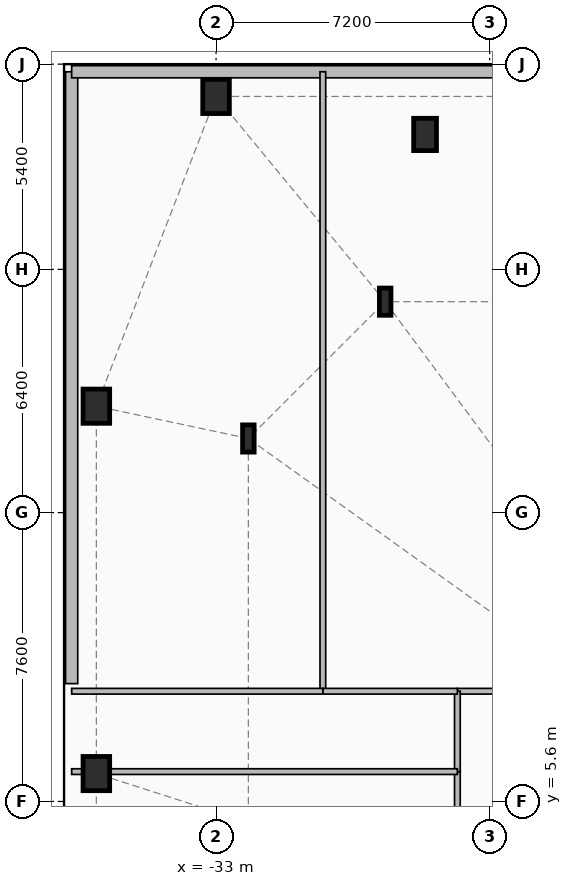
"""IFC4 building model, lengths in metres.
Left out: names, types, materials, properties, quantities, classifications, styles, units other than length and angle.
Written with IfcOpenShell. Run it as: python <this file> out.ifc"""

import sys

from ifc_helpers import new_model, si_unit, direction, frame, frame_2d, origin, origin_2d, place, context, subcontext, project, spatial, rectangle, i_section, extrude, element, fill, save


model = new_model("IFC4")
c1 = context("Model", 3, precision=1e-05, world=origin(), true_north=direction((0.0, 1.0)))
c2 = subcontext(c1, "Body", "Model", "MODEL_VIEW")
j1 = project(units=[si_unit("LENGTHUNIT", "METRE"), si_unit("PLANEANGLEUNIT", "RADIAN")], contexts=[c1])
p1 = place(None, origin())
s1 = spatial("IfcSite", under=j1, at=p1, CompositionType="ELEMENT")
p2 = place(p1, origin())
s2 = spatial("IfcBuilding", under=s1, at=p2, CompositionType="ELEMENT")
p3 = place(p2, frame((0.0, 0.0, 22.5)))
s3 = spatial("IfcBuildingStorey", under=s2, at=p3, CompositionType="ELEMENT", Elevation=22.5)
for number, where, z_axis, x_axis in (
    (1, (-33.0, 24.15, 0.0), (0.0, 0.0, 1.0), (1.0, 0.0, 0.0)),
    (2, (-36.15, 6.333, 0.0), (0.0, 0.0, 1.0), (1.0, 0.0, 0.0)),
    (3, (-36.15, 16.0, 0.0), (0.0, 0.0, 1.0), (1.0, 0.0, 0.0)),
):
    element("IfcColumn", number, at=place(p3, frame(where, z_axis=z_axis, x_axis=x_axis)), inside=s3, PredefinedType="COLUMN", context=c2, shape_type="SweptSolid", body=[
        extrude(rectangle(XDim=0.7, YDim=0.9, at=origin_2d()), origin(), (0.0, 0.0, 1.0), 4.5),
    ])
p4 = place(p3, frame((-27.5, 23.15, 0.0), z_axis=(0.0, 0.0, 1.0), x_axis=(1.0, 0.0, 0.0)))
e4 = element("IfcColumn", 4, at=p4, inside=s3, PredefinedType="PILASTER", context=c2, shape_type="SweptSolid", body=[
    extrude(rectangle(XDim=0.6, YDim=0.85, at=origin_2d()), origin(), (0.0, 0.0, 1.0), 4.5),
])
for number, where, z_axis, x_axis in (
    (5, (-28.55, 18.75, 0.0), (0.0, 0.0, 1.0), (1.0, 0.0, 0.0)),
    (6, (-32.15, 15.15, 0.0), (0.0, 0.0, 1.0), (1.0, 0.0, 0.0)),
):
    element("IfcColumn", number, at=place(p3, frame(where, z_axis=z_axis, x_axis=x_axis)), inside=s3, PredefinedType="COLUMN", context=c2, shape_type="SweptSolid", body=[
        extrude(i_section(OverallWidth=0.304, OverallDepth=0.716, WebThickness=0.021, FlangeThickness=0.04, FilletRadius=0.027, at=origin_2d()), origin(), (0.0, 0.0, 1.0), 4.5),
    ])
p5 = place(p3, frame((-36.8, 8.7, 0.0), z_axis=(0.0, 0.0, 1.0), x_axis=(0.0, 1.0, 0.0)))
e7 = element("IfcWall", 7, at=p5, inside=s3, PredefinedType="SOLIDWALL", context=c2, shape_type="SweptSolid", body=[
    extrude(rectangle(XDim=16.1, YDim=0.32, at=frame_2d((8.05, 0.0))), origin(), (0.0, 0.0, 1.0), 4.16),
])
p6 = place(p5, frame((8.485, 0.0, 0.85)))
e8 = element("IfcOpeningElement", 8, at=p6, cuts=e7, PredefinedType="OPENING", context=c2, shape_type="SweptSolid", body=[
    extrude(rectangle(XDim=2.6, YDim=2.4, at=frame_2d((1.3, 1.2))), frame((0.0, 0.17, 0.0), z_axis=(0.0, -1.0, 0.0), x_axis=(1.0, 0.0, 0.0)), (0.0, 0.0, 1.0), 0.34),
])
p7 = place(p3, frame((-36.8, 24.8, 0.0), z_axis=(0.0, 0.0, 1.0), x_axis=(1.0, 0.0, 0.0)))
e9 = element("IfcWall", 9, at=p7, inside=s3, PredefinedType="SOLIDWALL", context=c2, shape_type="SweptSolid", body=[
    extrude(rectangle(XDim=73.6, YDim=0.32, at=frame_2d((36.8, 0.0))), origin(), (0.0, 0.0, 1.0), 4.16),
])
p8 = place(p7, frame((1.079, 0.0, 0.85)))
e10 = element("IfcOpeningElement", 10, at=p8, cuts=e9, PredefinedType="OPENING", context=c2, shape_type="SweptSolid", body=[
    extrude(rectangle(XDim=2.3, YDim=2.4, at=frame_2d((1.15, 1.2))), frame((0.0, 0.17, 0.0), z_axis=(0.0, -1.0, 0.0), x_axis=(1.0, 0.0, 0.0)), (0.0, 0.0, 1.0), 0.34),
])
p9 = place(p7, frame((8.431, 0.0, 0.85)))
e11 = element("IfcOpeningElement", 11, at=p9, cuts=e9, PredefinedType="OPENING", context=c2, shape_type="SweptSolid", body=[
    extrude(rectangle(XDim=2.6, YDim=2.4, at=frame_2d((1.3, 1.2))), frame((0.0, 0.17, 0.0), z_axis=(0.0, -1.0, 0.0), x_axis=(1.0, 0.0, 0.0)), (0.0, 0.0, 1.0), 0.34),
])
p10 = place(p7, frame((13.316, 0.0, 0.85)))
e12 = element("IfcOpeningElement", 12, at=p10, cuts=e9, PredefinedType="OPENING", context=c2, shape_type="SweptSolid", body=[
    extrude(rectangle(XDim=1.1, YDim=1.85, at=frame_2d((0.55, 0.925))), frame((0.0, 0.17, 0.0), z_axis=(0.0, -1.0, 0.0), x_axis=(1.0, 0.0, 0.0)), (0.0, 0.0, 1.0), 0.34),
])
p11 = place(p7, frame((16.339, 0.0, 0.85)))
e13 = element("IfcOpeningElement", 13, at=p11, cuts=e9, PredefinedType="OPENING", context=c2, shape_type="SweptSolid", body=[
    extrude(rectangle(XDim=2.0, YDim=2.4, at=frame_2d((1.0, 1.2))), frame((0.0, 0.17, 0.0), z_axis=(0.0, -1.0, 0.0), x_axis=(1.0, 0.0, 0.0)), (0.0, 0.0, 1.0), 0.34),
])
p12 = place(p7, frame((21.875, 0.0, 0.85)))
e14 = element("IfcOpeningElement", 14, at=p12, cuts=e9, PredefinedType="OPENING", context=c2, shape_type="SweptSolid", body=[
    extrude(rectangle(XDim=2.3, YDim=2.4, at=frame_2d((1.15, 1.2))), frame((0.0, 0.17, 0.0), z_axis=(0.0, -1.0, 0.0), x_axis=(1.0, 0.0, 0.0)), (0.0, 0.0, 1.0), 0.34),
])
p13 = place(p7, frame((26.53, 0.0, 0.85)))
e15 = element("IfcOpeningElement", 15, at=p13, cuts=e9, PredefinedType="OPENING", context=c2, shape_type="SweptSolid", body=[
    extrude(rectangle(XDim=2.6, YDim=2.4, at=frame_2d((1.3, 1.2))), frame((0.0, 0.17, 0.0), z_axis=(0.0, -1.0, 0.0), x_axis=(1.0, 0.0, 0.0)), (0.0, 0.0, 1.0), 0.34),
])
p14 = place(p7, frame((32.537, 0.0, 0.85)))
e16 = element("IfcOpeningElement", 16, at=p14, cuts=e9, PredefinedType="OPENING", context=c2, shape_type="SweptSolid", body=[
    extrude(rectangle(XDim=2.6, YDim=2.4, at=frame_2d((1.3, 1.2))), frame((0.0, 0.17, 0.0), z_axis=(0.0, -1.0, 0.0), x_axis=(1.0, 0.0, 0.0)), (0.0, 0.0, 1.0), 0.34),
])
p15 = place(p7, frame((38.543, 0.0, 0.85)))
e17 = element("IfcOpeningElement", 17, at=p15, cuts=e9, PredefinedType="OPENING", context=c2, shape_type="SweptSolid", body=[
    extrude(rectangle(XDim=2.6, YDim=2.4, at=frame_2d((1.3, 1.2))), frame((0.0, 0.17, 0.0), z_axis=(0.0, -1.0, 0.0), x_axis=(1.0, 0.0, 0.0)), (0.0, 0.0, 1.0), 0.34),
])
p16 = place(p7, frame((44.55, 0.0, 0.85)))
e18 = element("IfcOpeningElement", 18, at=p16, cuts=e9, PredefinedType="OPENING", context=c2, shape_type="SweptSolid", body=[
    extrude(rectangle(XDim=2.6, YDim=2.4, at=frame_2d((1.3, 1.2))), frame((0.0, 0.17, 0.0), z_axis=(0.0, -1.0, 0.0), x_axis=(1.0, 0.0, 0.0)), (0.0, 0.0, 1.0), 0.34),
])
p17 = place(p7, frame((50.556, 0.0, 0.85)))
e19 = element("IfcOpeningElement", 19, at=p17, cuts=e9, PredefinedType="OPENING", context=c2, shape_type="SweptSolid", body=[
    extrude(rectangle(XDim=2.6, YDim=2.4, at=frame_2d((1.3, 1.2))), frame((0.0, 0.17, 0.0), z_axis=(0.0, -1.0, 0.0), x_axis=(1.0, 0.0, 0.0)), (0.0, 0.0, 1.0), 0.34),
])
p18 = place(p7, frame((55.341, 0.0, 0.85)))
e20 = element("IfcOpeningElement", 20, at=p18, cuts=e9, PredefinedType="OPENING", context=c2, shape_type="SweptSolid", body=[
    extrude(rectangle(XDim=2.0, YDim=2.4, at=frame_2d((1.0, 1.2))), frame((0.0, 0.17, 0.0), z_axis=(0.0, -1.0, 0.0), x_axis=(1.0, 0.0, 0.0)), (0.0, 0.0, 1.0), 0.34),
])
p19 = place(p7, frame((59.16, 0.0, 0.85)))
e21 = element("IfcOpeningElement", 21, at=p19, cuts=e9, PredefinedType="OPENING", context=c2, shape_type="SweptSolid", body=[
    extrude(rectangle(XDim=1.1, YDim=1.85, at=frame_2d((0.55, 0.925))), frame((0.0, 0.17, 0.0), z_axis=(0.0, -1.0, 0.0), x_axis=(1.0, 0.0, 0.0)), (0.0, 0.0, 1.0), 0.34),
])
p20 = place(p7, frame((62.649, 0.0, 0.85)))
e22 = element("IfcOpeningElement", 22, at=p20, cuts=e9, PredefinedType="OPENING", context=c2, shape_type="SweptSolid", body=[
    extrude(rectangle(XDim=2.6, YDim=2.4, at=frame_2d((1.3, 1.2))), frame((0.0, 0.17, 0.0), z_axis=(0.0, -1.0, 0.0), x_axis=(1.0, 0.0, 0.0)), (0.0, 0.0, 1.0), 0.34),
])
p21 = place(p7, frame((70.301, 0.0, 0.85)))
e23 = element("IfcOpeningElement", 23, at=p21, cuts=e9, PredefinedType="OPENING", context=c2, shape_type="SweptSolid", body=[
    extrude(rectangle(XDim=2.3, YDim=2.4, at=frame_2d((1.15, 1.2))), frame((0.0, 0.17, 0.0), z_axis=(0.0, -1.0, 0.0), x_axis=(1.0, 0.0, 0.0)), (0.0, 0.0, 1.0), 0.34),
])
p22 = place(p3, frame((-26.65, 8.5, 0.0), z_axis=(0.0, 0.0, 1.0), x_axis=(1.0, 0.0, 0.0)))
e24 = element("IfcWall", 24, at=p22, inside=s3, PredefinedType="PARTITIONING", context=c2, shape_type="SweptSolid", body=[
    extrude(rectangle(XDim=2.65, YDim=0.15, at=frame_2d((1.325, 0.0))), origin(), (0.0, 0.0, 1.0), 4.16),
])
p23 = place(p22, frame((0.635, 0.0, 0.0)))
e25 = element("IfcOpeningElement", 25, at=p23, cuts=e24, PredefinedType="OPENING", context=c2, shape_type="SweptSolid", body=[
    extrude(rectangle(XDim=1.05, YDim=2.15, at=frame_2d((0.525, 1.075))), frame((0.0, 0.085, 0.0), z_axis=(0.0, -1.0, 0.0), x_axis=(1.0, 0.0, 0.0)), (0.0, 0.0, 1.0), 0.17),
])
p24 = place(p3, frame((-26.65, 4.27, 0.0), z_axis=(0.0, 0.0, 1.0), x_axis=(0.0, 1.0, 0.0)))
e26 = element("IfcWall", 26, at=p24, inside=s3, PredefinedType="PARTITIONING", context=c2, shape_type="SweptSolid", body=[
    extrude(rectangle(XDim=2.115, YDim=0.15, at=frame_2d((1.058, 0.0))), origin(), (0.0, 0.0, 1.0), 4.16),
])
p25 = place(p24, frame((0.583, 0.0, 0.0)))
e27 = element("IfcOpeningElement", 27, at=p25, cuts=e26, PredefinedType="OPENING", context=c2, shape_type="SweptSolid", body=[
    extrude(rectangle(XDim=0.95, YDim=2.1, at=frame_2d((0.475, 1.05))), frame((0.0, 0.085, 0.0), z_axis=(0.0, -1.0, 0.0), x_axis=(1.0, 0.0, 0.0)), (0.0, 0.0, 1.0), 0.17),
])
p26 = place(p3, frame((-26.65, 6.385, 0.0), z_axis=(0.0, 0.0, 1.0), x_axis=(0.0, 1.0, 0.0)))
e28 = element("IfcWall", 28, at=p26, inside=s3, PredefinedType="PARTITIONING", context=c2, shape_type="SweptSolid", body=[
    extrude(rectangle(XDim=2.115, YDim=0.15, at=frame_2d((1.058, 0.0))), origin(), (0.0, 0.0, 1.0), 4.16),
])
p27 = place(p26, frame((0.583, 0.0, 0.0)))
e29 = element("IfcOpeningElement", 29, at=p27, cuts=e28, PredefinedType="OPENING", context=c2, shape_type="SweptSolid", body=[
    extrude(rectangle(XDim=0.95, YDim=2.1, at=frame_2d((0.475, 1.05))), frame((0.0, 0.085, 0.0), z_axis=(0.0, -1.0, 0.0), x_axis=(1.0, 0.0, 0.0)), (0.0, 0.0, 1.0), 0.17),
])
p28 = place(p3, frame((-30.19, 8.5, 0.0), z_axis=(0.0, 0.0, 1.0), x_axis=(0.0, 1.0, 0.0)))
e30 = element("IfcWall", 30, at=p28, inside=s3, PredefinedType="PARTITIONING", context=c2, shape_type="SweptSolid", body=[
    extrude(rectangle(XDim=16.3, YDim=0.15, at=frame_2d((8.15, 0.0))), origin(), (0.0, 0.0, 1.0), 4.16),
])
p29 = place(p28, frame((2.341, 0.0, 0.0)))
e31 = element("IfcOpeningElement", 31, at=p29, cuts=e30, PredefinedType="OPENING", context=c2, shape_type="SweptSolid", body=[
    extrude(rectangle(XDim=1.05, YDim=2.15, at=frame_2d((0.525, 1.075))), frame((0.0, 0.085, 0.0), z_axis=(0.0, -1.0, 0.0), x_axis=(1.0, 0.0, 0.0)), (0.0, 0.0, 1.0), 0.17),
])
p30 = place(p3, frame((-26.65, 8.5, 0.0), z_axis=(0.0, 0.0, 1.0), x_axis=(-1.0, 0.0, 0.0)))
e32 = element("IfcWall", 32, at=p30, inside=s3, PredefinedType="PARTITIONING", context=c2, shape_type="SweptSolid", body=[
    extrude(rectangle(XDim=3.54, YDim=0.15, at=frame_2d((1.77, 0.0))), origin(), (0.0, 0.0, 1.0), 4.16),
])
p31 = place(p3, frame((-30.19, 8.5, 0.0), z_axis=(0.0, 0.0, 1.0), x_axis=(-1.0, 0.0, 0.0)))
e33 = element("IfcWall", 33, at=p31, inside=s3, PredefinedType="PARTITIONING", context=c2, shape_type="SweptSolid", body=[
    extrude(rectangle(XDim=6.61, YDim=0.15, at=frame_2d((3.305, 0.0))), origin(), (0.0, 0.0, 1.0), 4.16),
])
p32 = place(p3, frame((-36.8, 6.385, 0.0), z_axis=(0.0, 0.0, 1.0), x_axis=(1.0, 0.0, 0.0)))
e34 = element("IfcWall", 34, at=p32, inside=s3, PredefinedType="PARTITIONING", context=c2, shape_type="SweptSolid", body=[
    extrude(rectangle(XDim=10.15, YDim=0.15, at=frame_2d((5.075, 0.0))), origin(), (0.0, 0.0, 1.0), 3.545),
])
p33 = place(p6, origin())
e35 = element("IfcWindow", 35, at=p33, inside=s3, PartitioningType="SINGLE_PANEL", PredefinedType="WINDOW", context=c2, shape_type="SweptSolid", body=[
    extrude(rectangle(XDim=2.6, YDim=2.4, at=frame_2d((1.3, 1.2))), frame((0.0, 0.03, 0.0), z_axis=(0.0, -1.0, 0.0), x_axis=(1.0, 0.0, 0.0)), (0.0, 0.0, 1.0), 0.06),
])
fill(e8, e35)
p34 = place(p8, origin())
e36 = element("IfcWindow", 36, at=p34, inside=s3, PartitioningType="SINGLE_PANEL", PredefinedType="WINDOW", context=c2, shape_type="SweptSolid", body=[
    extrude(rectangle(XDim=2.3, YDim=2.4, at=frame_2d((1.15, 1.2))), frame((0.0, 0.03, 0.0), z_axis=(0.0, -1.0, 0.0), x_axis=(1.0, 0.0, 0.0)), (0.0, 0.0, 1.0), 0.06),
])
fill(e10, e36)
p35 = place(p9, origin())
e37 = element("IfcWindow", 37, at=p35, inside=s3, PartitioningType="SINGLE_PANEL", PredefinedType="WINDOW", context=c2, shape_type="SweptSolid", body=[
    extrude(rectangle(XDim=2.6, YDim=2.4, at=frame_2d((1.3, 1.2))), frame((0.0, 0.03, 0.0), z_axis=(0.0, -1.0, 0.0), x_axis=(1.0, 0.0, 0.0)), (0.0, 0.0, 1.0), 0.06),
])
fill(e11, e37)
p36 = place(p23, origin())
e38 = element("IfcDoor", 38, at=p36, inside=s3, OperationType="SINGLE_SWING_RIGHT", PredefinedType="DOOR", context=c2, shape_type="SweptSolid", body=[
    extrude(rectangle(XDim=1.05, YDim=2.15, at=frame_2d((0.525, 1.075))), frame((0.0, 0.025, 0.0), z_axis=(0.0, -1.0, 0.0), x_axis=(1.0, 0.0, 0.0)), (0.0, 0.0, 1.0), 0.05),
])
fill(e25, e38)
p37 = place(p25, origin())
e39 = element("IfcDoor", 39, at=p37, inside=s3, OperationType="SINGLE_SWING_RIGHT", PredefinedType="DOOR", context=c2, shape_type="SweptSolid", body=[
    extrude(rectangle(XDim=0.95, YDim=2.1, at=frame_2d((0.475, 1.05))), frame((0.0, 0.025, 0.0), z_axis=(0.0, -1.0, 0.0), x_axis=(1.0, 0.0, 0.0)), (0.0, 0.0, 1.0), 0.05),
])
fill(e27, e39)
p38 = place(p27, origin())
e40 = element("IfcDoor", 40, at=p38, inside=s3, OperationType="SINGLE_SWING_LEFT", PredefinedType="DOOR", context=c2, shape_type="SweptSolid", body=[
    extrude(rectangle(XDim=0.95, YDim=2.1, at=frame_2d((0.475, 1.05))), frame((0.0, 0.025, 0.0), z_axis=(0.0, -1.0, 0.0), x_axis=(1.0, 0.0, 0.0)), (0.0, 0.0, 1.0), 0.05),
])
fill(e29, e40)
p39 = place(p29, origin())
e41 = element("IfcDoor", 41, at=p39, inside=s3, OperationType="SINGLE_SWING_RIGHT", PredefinedType="DOOR", context=c2, shape_type="SweptSolid", body=[
    extrude(rectangle(XDim=1.05, YDim=2.15, at=frame_2d((0.525, 1.075))), frame((0.0, 0.025, 0.0), z_axis=(0.0, -1.0, 0.0), x_axis=(1.0, 0.0, 0.0)), (0.0, 0.0, 1.0), 0.05),
])
fill(e31, e41)
save(model, sys.argv[1])
